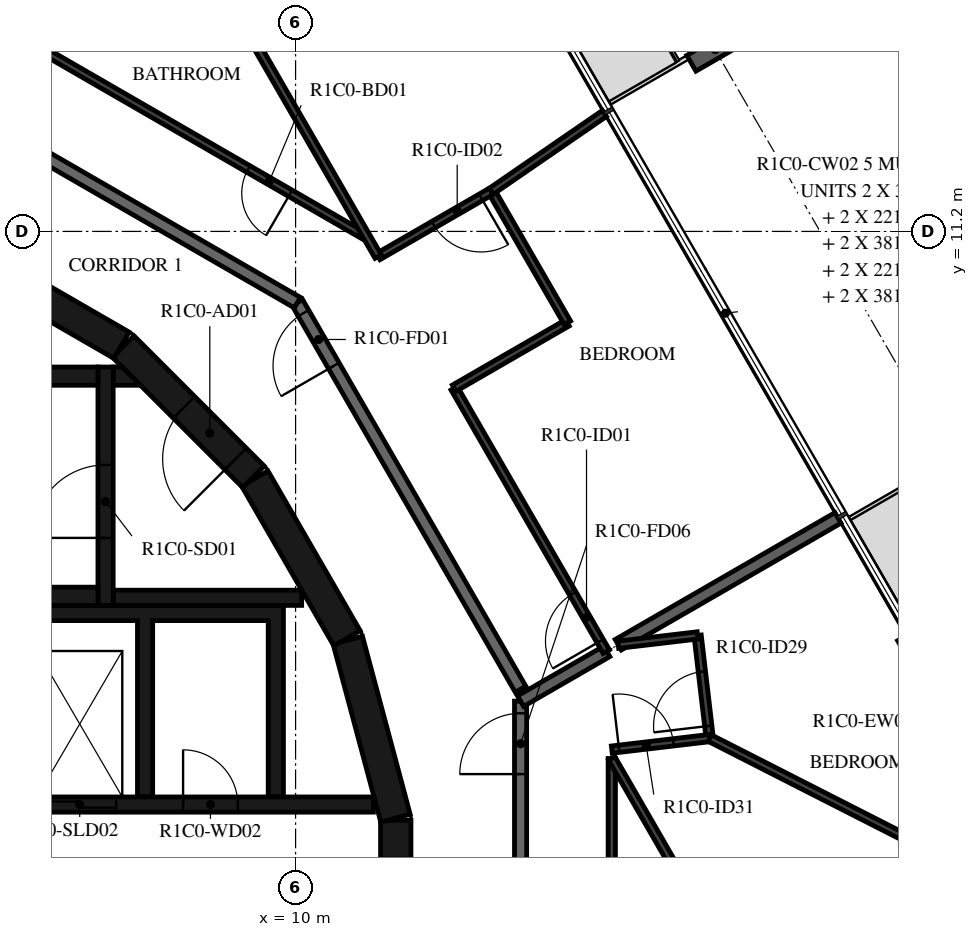
"""IFC4 building model, lengths in metres.
Left out: names, types, materials, properties, quantities, classifications, styles, units other than length and angle.
Written with IfcOpenShell. Run it as: python <this file> out.ifc"""

import sys

from ifc_helpers import new_model, si_unit, direction, frame, frame_2d, origin, origin_2d, place, context, subcontext, project, spatial, polyline, rectangle, i_section, outline, extrude, element, fill, save


model = new_model("IFC4")
c1 = context("Model", 3, precision=1e-05, world=origin(), true_north=direction((0.0, 1.0)))
c2 = subcontext(c1, "Body", "Model", "MODEL_VIEW")
j1 = project(units=[si_unit("LENGTHUNIT", "METRE"), si_unit("PLANEANGLEUNIT", "RADIAN")], contexts=[c1])
p1 = place(None, origin())
s1 = spatial("IfcSite", under=j1, at=p1, CompositionType="ELEMENT")
p2 = place(p1, origin())
s2 = spatial("IfcBuilding", under=s1, at=p2, CompositionType="ELEMENT")
p3 = place(p2, frame((0.0, 0.0, 66.4)))
s3 = spatial("IfcBuildingStorey", under=s2, at=p3, CompositionType="ELEMENT", Elevation=66.4)
p4 = place(p3, frame((16.899, 14.19, -0.38), z_axis=(0.0, 0.0, 1.0), x_axis=(0.50000017485, -0.866025302835, 0.0)))
e1 = element("IfcColumn", 1, at=p4, inside=s3, PredefinedType="COLUMN", context=c2, shape_type="SweptSolid", body=[
    extrude(i_section(OverallWidth=0.3, OverallDepth=0.9, WebThickness=0.019, FlangeThickness=0.035, FilletRadius=0.03, at=origin_2d()), origin(), (0.0, 0.0, 1.0), 2.616),
])
p5 = place(p3, frame((21.571, 1.738, 0.0), z_axis=(0.0, 0.0, 1.0), x_axis=(-0.500028443584, 0.866008981251, 0.0)))
e2 = element("IfcWall", 2, at=p5, inside=s3, PredefinedType="STANDARD", context=c2, shape_type="SweptSolid", body=[
    extrude(rectangle(XDim=3.2, YDim=0.16, at=frame_2d((1.6, 0.0))), origin(), (0.0, 0.0, 1.0), 3.05),
])
p6 = place(p5, frame((0.4, 0.0, 0.0)))
e3 = element("IfcOpeningElement", 3, at=p6, cuts=e2, PredefinedType="OPENING", context=c2, shape_type="SweptSolid", body=[
    extrude(rectangle(XDim=2.4, YDim=2.4, at=frame_2d((1.2, 1.2))), frame((0.0, 0.09, 0.0), z_axis=(0.0, -1.0, 0.0), x_axis=(1.0, 0.0, 0.0)), (0.0, 0.0, 1.0), 0.18),
])
p7 = place(p3, frame((11.647, -1.516, 0.0), z_axis=(0.0, 0.0, 1.0), x_axis=(0.0, 1.0, 0.0)))
e4 = element("IfcWall", 4, at=p7, inside=s3, PredefinedType="SHEAR", context=c2, shape_type="SweptSolid", body=[
    extrude(rectangle(XDim=3.033, YDim=0.5, at=frame_2d((1.516, 0.0))), origin(), (0.0, 0.0, 1.0), 3.05),
])
p8 = place(p7, frame((0.616, 0.0, 0.0)))
e5 = element("IfcOpeningElement", 5, at=p8, cuts=e4, PredefinedType="OPENING", context=c2, shape_type="SweptSolid", body=[
    extrude(rectangle(XDim=1.8, YDim=2.1, at=frame_2d((0.9, 1.05))), frame((0.0, 0.26, 0.0), z_axis=(0.0, -1.0, 0.0), x_axis=(1.0, 0.0, 0.0)), (0.0, 0.0, 1.0), 0.52),
])
for number, where, z_axis, x_axis in (
    (6, (11.643, 1.55, 0.0), (0.0, 0.0, 1.0), (-0.259, 0.966, 0.0)),
    (7, (10.845, 4.51, 0.0), (0.0, 0.0, 1.0), (-0.5, 0.866, 0.0)),
):
    element("IfcWall", number, at=place(p3, frame(where, z_axis=z_axis, x_axis=x_axis)), inside=s3, PredefinedType="SHEAR", context=c2, shape_type="SweptSolid", body=[
        extrude(rectangle(XDim=3.033, YDim=0.5, at=frame_2d((1.516, 0.0))), origin(), (0.0, 0.0, 1.0), 3.05),
    ])
p9 = place(p3, frame((9.308, 7.164, 0.0), z_axis=(0.0, 0.0, 1.0), x_axis=(-0.707106781187, 0.707106781187, 0.0)))
e8 = element("IfcWall", 8, at=p9, inside=s3, PredefinedType="SHEAR", context=c2, shape_type="SweptSolid", body=[
    extrude(rectangle(XDim=3.032, YDim=0.5, at=frame_2d((1.516, 0.0))), origin(), (0.0, 0.0, 1.0), 3.05),
])
p10 = place(p9, frame((0.416, 0.0, 0.0)))
e9 = element("IfcOpeningElement", 9, at=p10, cuts=e8, PredefinedType="OPENING", context=c2, shape_type="SweptSolid", body=[
    extrude(rectangle(XDim=1.2, YDim=2.1, at=frame_2d((0.6, 1.05))), frame((0.0, 0.26, 0.0), z_axis=(0.0, -1.0, 0.0), x_axis=(1.0, 0.0, 0.0)), (0.0, 0.0, 1.0), 0.52),
])
p11 = place(p3, frame((7.137, 9.329, 0.0), z_axis=(0.0, 0.0, 1.0), x_axis=(-0.865975092491, 0.500087131594, 0.0)))
e10 = element("IfcWall", 10, at=p11, inside=s3, PredefinedType="SHEAR", context=c2, shape_type="SweptSolid", body=[
    extrude(rectangle(XDim=3.033, YDim=0.5, at=frame_2d((1.516, 0.0))), origin(), (0.0, 0.0, 1.0), 3.05),
])
for number, where, z_axis, x_axis in (
    (11, (0.0, 5.2, 0.0), (0.0, 0.0, 1.0), (1.0, 0.0, 0.0)),
    (12, (0.0, 8.82, 0.0), (0.0, 0.0, 1.0), (1.0, 0.0, 0.0)),
):
    element("IfcWall", number, at=place(p3, frame(where, z_axis=z_axis, x_axis=x_axis)), inside=s3, PredefinedType="SHEAR", context=c2, shape_type="SweptSolid", body=[
        extrude(rectangle(XDim=6.75, YDim=0.3, at=frame_2d((3.375, 0.0))), origin(), (0.0, 0.0, 1.0), 3.05),
    ])
p12 = place(p3, frame((6.875, 5.05, 0.0), z_axis=(0.0, 0.0, 1.0), x_axis=(0.0, 1.0, 0.0)))
e13 = element("IfcWall", 13, at=p12, inside=s3, PredefinedType="SHEAR", context=c2, shape_type="SweptSolid", body=[
    extrude(rectangle(XDim=3.92, YDim=0.25, at=frame_2d((1.96, 0.0))), origin(), (0.0, 0.0, 1.0), 3.05),
])
p13 = place(p12, frame((1.11, 0.0, 0.0)))
e14 = element("IfcOpeningElement", 14, at=p13, cuts=e13, PredefinedType="OPENING", context=c2, shape_type="SweptSolid", body=[
    extrude(rectangle(XDim=1.2, YDim=2.1, at=frame_2d((0.6, 1.05))), frame((0.0, 0.135, 0.0), z_axis=(0.0, -1.0, 0.0), x_axis=(1.0, 0.0, 0.0)), (0.0, 0.0, 1.0), 0.27),
])
p14 = place(p3, frame((7.0, 5.175, 0.0), z_axis=(0.0, 0.0, 1.0), x_axis=(1.0, 0.0, 0.0)))
e15 = element("IfcWall", 15, at=p14, inside=s3, PredefinedType="SHEAR", context=c2, shape_type="SweptSolid", body=[
    extrude(rectangle(XDim=3.1, YDim=0.25, at=frame_2d((1.55, 0.0))), origin(), (0.0, 0.0, 1.0), 3.05),
])
p15 = place(p3, origin())
e16 = element("IfcWall", 16, at=p15, inside=s3, PredefinedType="SHEAR", context=c2, shape_type="SweptSolid", body=[
    extrude(outline(polyline([(7.448, 8.67), (7.0, 8.67), (7.0, 8.97), (7.148, 8.97), (7.448, 8.67)])), origin(), (0.0, 0.0, 1.0), 3.05),
])
p16 = place(p3, origin())
e17 = element("IfcWall", 17, at=p16, inside=s3, PredefinedType="SHEAR", context=c2, shape_type="SweptSolid", body=[
    extrude(outline(polyline([(-9.55, 4.8), (-7.65, 4.8), (-7.65, 1.9), (-7.4, 1.9), (-7.4, 4.8), (-5.5, 4.8), (-5.5, 1.9), (-5.25, 1.9), (-5.25, 4.8), (-3.35, 4.8), (-3.35, 1.9), (-3.1, 1.9), (-3.1, 4.8), (-1.2, 4.8), (-1.2, 1.9), (-0.95, 1.9), (-0.95, 4.8), (3.1, 4.8), (3.1, 1.9), (3.35, 1.9), (3.35, 4.8), (5.25, 4.8), (5.25, 1.9), (5.5, 1.9), (5.5, 4.8), (7.4, 4.8), (7.4, 1.9), (7.65, 1.9), (7.65, 4.8), (9.55, 4.8), (9.55, 1.9), (9.8, 1.9), (9.8, 4.8), (9.8, 5.05), (-9.8, 5.05), (-9.8, 4.8), (-9.8, 1.9), (-9.55, 1.9), (-9.55, 4.8)])), origin(), (0.0, 0.0, 1.0), 3.05),
])
p17 = place(p3, frame((3.35, 1.775, 0.0), z_axis=(0.0, 0.0, 1.0), x_axis=(1.0, 0.0, 0.0)))
e18 = element("IfcWall", 18, at=p17, inside=s3, PredefinedType="SHEAR", context=c2, shape_type="SweptSolid", body=[
    extrude(rectangle(XDim=7.93, YDim=0.25, at=frame_2d((3.965, 0.0))), origin(), (0.0, 0.0, 1.0), 3.05),
])
p18 = place(p17, frame((0.35, 0.0, 0.0)))
e19 = element("IfcOpeningElement", 19, at=p18, cuts=e18, PredefinedType="OPENING", context=c2, shape_type="SweptSolid", body=[
    extrude(rectangle(XDim=1.2, YDim=2.4, at=frame_2d((0.6, 1.2))), frame((0.0, 0.135, 0.0), z_axis=(0.0, -1.0, 0.0), x_axis=(1.0, 0.0, 0.0)), (0.0, 0.0, 1.0), 0.27),
])
p19 = place(p17, frame((2.5, 0.0, 0.0)))
e20 = element("IfcOpeningElement", 20, at=p19, cuts=e18, PredefinedType="OPENING", context=c2, shape_type="SweptSolid", body=[
    extrude(rectangle(XDim=1.2, YDim=2.4, at=frame_2d((0.6, 1.2))), frame((0.0, 0.135, 0.0), z_axis=(0.0, -1.0, 0.0), x_axis=(1.0, 0.0, 0.0)), (0.0, 0.0, 1.0), 0.27),
])
p20 = place(p17, frame((4.8, 0.0, 0.0)))
e21 = element("IfcOpeningElement", 21, at=p20, cuts=e18, PredefinedType="OPENING", context=c2, shape_type="SweptSolid", body=[
    extrude(rectangle(XDim=0.9, YDim=2.1, at=frame_2d((0.45, 1.05))), frame((0.0, 0.135, 0.0), z_axis=(0.0, -1.0, 0.0), x_axis=(1.0, 0.0, 0.0)), (0.0, 0.0, 1.0), 0.27),
])
p21 = place(p3, frame((13.7, 3.671, 0.0), z_axis=(0.0, 0.0, 1.0), x_axis=(-0.500001669485, 0.866024439905, 0.0)))
e22 = element("IfcWall", 22, at=p21, inside=s3, PredefinedType="STANDARD", context=c2, shape_type="SweptSolid", body=[
    extrude(rectangle(XDim=7.342, YDim=0.2, at=frame_2d((3.671, 0.0))), origin(), (0.0, 0.0, 1.0), 3.05),
])
p22 = place(p21, frame((6.142, 0.0, 0.0)))
e23 = element("IfcOpeningElement", 23, at=p22, cuts=e22, PredefinedType="OPENING", context=c2, shape_type="SweptSolid", body=[
    extrude(rectangle(XDim=1.0, YDim=2.1, at=frame_2d((0.5, 1.05))), frame((0.0, 0.11, 0.0), z_axis=(0.0, -1.0, 0.0), x_axis=(1.0, 0.0, 0.0)), (0.0, 0.0, 1.0), 0.22),
])
p23 = place(p3, frame((10.029, 10.029, 0.0), z_axis=(0.0, 0.0, 1.0), x_axis=(-0.866024439905, 0.500001669485, 0.0)))
e24 = element("IfcWall", 24, at=p23, inside=s3, PredefinedType="STANDARD", context=c2, shape_type="SweptSolid", body=[
    extrude(rectangle(XDim=7.342, YDim=0.2, at=frame_2d((3.671, 0.0))), origin(), (0.0, 0.0, 1.0), 3.05),
])
p24 = place(p3, frame((13.7, -3.671, 0.0), z_axis=(0.0, 0.0, 1.0), x_axis=(0.0, 1.0, 0.0)))
e25 = element("IfcWall", 25, at=p24, inside=s3, PredefinedType="STANDARD", context=c2, shape_type="SweptSolid", body=[
    extrude(rectangle(XDim=7.146, YDim=0.2, at=frame_2d((3.573, 0.0))), origin(), (0.0, 0.0, 1.0), 3.05),
])
p25 = place(p24, frame((5.947, 0.0, 0.0)))
e26 = element("IfcOpeningElement", 26, at=p25, cuts=e25, PredefinedType="OPENING", context=c2, shape_type="SweptSolid", body=[
    extrude(rectangle(XDim=1.0, YDim=2.1, at=frame_2d((0.5, 1.05))), frame((0.0, 0.11, 0.0), z_axis=(0.0, -1.0, 0.0), x_axis=(1.0, 0.0, 0.0)), (0.0, 0.0, 1.0), 0.22),
])
p26 = place(p3, frame((13.7, 3.476, 0.0), z_axis=(0.0, 0.0, 1.0), x_axis=(0.866014281772, 0.500019263395, 0.0)))
e27 = element("IfcWall", 27, at=p26, inside=s3, PredefinedType="STANDARD", context=c2, shape_type="SweptSolid", body=[
    extrude(rectangle(XDim=1.638, YDim=0.2, at=frame_2d((0.819, 0.0))), origin(), (0.0, 0.0, 1.0), 3.05),
])
p27 = place(p3, frame((15.306, 4.403, 0.0), z_axis=(0.0, 0.0, 1.0), x_axis=(0.866013143551, 0.500021234745, 0.0)))
e28 = element("IfcWall", 28, at=p27, inside=s3, PredefinedType="STANDARD", context=c2, shape_type="SweptSolid", body=[
    extrude(rectangle(XDim=4.173, YDim=0.2, at=frame_2d((2.086, 0.0))), origin(), (0.0, 0.0, 1.0), 3.05),
])
p28 = place(p3, frame((15.11, 4.289, 0.0), z_axis=(0.0, 0.0, 1.0), x_axis=(-0.500033654285, 0.866005972602, 0.0)))
e29 = element("IfcWall", 29, at=p28, inside=s3, PredefinedType="PARTITIONING", context=c2, shape_type="SweptSolid", body=[
    extrude(rectangle(XDim=5.003, YDim=0.12, at=frame_2d((2.501, 0.0))), origin(), (0.0, 0.0, 1.0), 3.05),
])
p29 = place(p28, frame((0.2, 0.0, 0.0)))
e30 = element("IfcOpeningElement", 30, at=p29, cuts=e29, PredefinedType="OPENING", context=c2, shape_type="SweptSolid", body=[
    extrude(rectangle(XDim=0.9, YDim=2.1, at=frame_2d((0.45, 1.05))), frame((0.0, 0.07, 0.0), z_axis=(0.0, -1.0, 0.0), x_axis=(1.0, 0.0, 0.0)), (0.0, 0.0, 1.0), 0.14),
])
p30 = place(p3, frame((12.608, 8.622, 0.0), z_axis=(0.0, 0.0, 1.0), x_axis=(0.866005997533, 0.500033611107, 0.0)))
e31 = element("IfcWall", 31, at=p30, inside=s3, PredefinedType="PARTITIONING", context=c2, shape_type="SweptSolid", body=[
    extrude(rectangle(XDim=2.151, YDim=0.12, at=frame_2d((1.075, 0.0))), origin(), (0.0, 0.0, 1.0), 3.05),
])
p31 = place(p3, frame((14.471, 9.697, 0.0), z_axis=(0.0, 0.0, 1.0), x_axis=(-0.500004234368, 0.866022959057, 0.0)))
e32 = element("IfcWall", 32, at=p31, inside=s3, PredefinedType="PARTITIONING", context=c2, shape_type="SweptSolid", body=[
    extrude(rectangle(XDim=2.5, YDim=0.12, at=frame_2d((1.25, 0.0))), origin(), (0.0, 0.0, 1.0), 3.05),
])
p32 = place(p3, frame((13.221, 11.862, 0.0), z_axis=(0.0, 0.0, 1.0), x_axis=(-0.866055151781, -0.499948471418, 0.0)))
e33 = element("IfcWall", 33, at=p32, inside=s3, PredefinedType="PARTITIONING", context=c2, shape_type="SweptSolid", body=[
    extrude(rectangle(XDim=2.151, YDim=0.12, at=frame_2d((1.075, 0.0))), origin(), (0.0, 0.0, 1.0), 3.05),
])
p33 = place(p32, frame((0.2, 0.0, 0.0)))
e34 = element("IfcOpeningElement", 34, at=p33, cuts=e33, PredefinedType="OPENING", context=c2, shape_type="SweptSolid", body=[
    extrude(rectangle(XDim=0.9, YDim=2.1, at=frame_2d((0.45, 1.05))), frame((0.0, 0.07, 0.0), z_axis=(0.0, -1.0, 0.0), x_axis=(1.0, 0.0, 0.0)), (0.0, 0.0, 1.0), 0.14),
])
p34 = place(p3, frame((11.127, 11.127, 0.0), z_axis=(0.0, 0.0, 1.0), x_axis=(-0.86602299963, 0.500004164094, 0.0)))
e35 = element("IfcWall", 35, at=p34, inside=s3, PredefinedType="PARTITIONING", context=c2, shape_type="SweptSolid", body=[
    extrude(rectangle(XDim=7.052, YDim=0.12, at=frame_2d((3.526, 0.0))), origin(), (0.0, 0.0, 1.0), 3.05),
])
p35 = place(p34, frame((1.4, 0.0, 0.0)))
e36 = element("IfcOpeningElement", 36, at=p35, cuts=e35, PredefinedType="OPENING", context=c2, shape_type="SweptSolid", body=[
    extrude(rectangle(XDim=0.8, YDim=2.1, at=frame_2d((0.4, 1.05))), frame((0.0, 0.07, 0.0), z_axis=(0.0, -1.0, 0.0), x_axis=(1.0, 0.0, 0.0)), (0.0, 0.0, 1.0), 0.14),
])
p36 = place(p3, frame((15.08, 13.14, 0.0), z_axis=(0.0, 0.0, 1.0), x_axis=(-0.824041924199, -0.566528822887, 0.0)))
e37 = element("IfcWall", 37, at=p36, inside=s3, PredefinedType="PARTITIONING", context=c2, shape_type="SweptSolid", body=[
    extrude(rectangle(XDim=2.256, YDim=0.12, at=frame_2d((1.128, 0.0))), origin(), (0.0, 0.0, 1.0), 3.05),
])
p37 = place(p3, frame((8.7, 15.392, 0.0), z_axis=(0.0, 0.0, 1.0), x_axis=(0.499986106925, -0.866033424806, 0.0)))
e38 = element("IfcWall", 38, at=p37, inside=s3, PredefinedType="PARTITIONING", context=c2, shape_type="SweptSolid", body=[
    extrude(rectangle(XDim=5.317, YDim=0.12, at=frame_2d((2.659, 0.0))), origin(), (0.0, 0.0, 1.0), 3.05),
])
p38 = place(p3, frame((16.81, 2.868, 0.0), z_axis=(0.0, 0.0, 1.0), x_axis=(-0.117049566217, 0.993126074096, 0.0)))
e39 = element("IfcWall", 39, at=p38, inside=s3, PredefinedType="PARTITIONING", context=c2, shape_type="SweptSolid", body=[
    extrude(rectangle(XDim=1.7, YDim=0.12, at=frame_2d((0.85, 0.0))), origin(), (0.0, 0.0, 1.0), 3.05),
])
p39 = place(p38, frame((0.2, 0.0, 0.0)))
e40 = element("IfcOpeningElement", 40, at=p39, cuts=e39, PredefinedType="OPENING", context=c2, shape_type="SweptSolid", body=[
    extrude(rectangle(XDim=0.9, YDim=2.1, at=frame_2d((0.45, 1.05))), frame((0.0, 0.07, 0.0), z_axis=(0.0, -1.0, 0.0), x_axis=(1.0, 0.0, 0.0)), (0.0, 0.0, 1.0), 0.14),
])
p40 = place(p3, frame((16.611, 4.556, 0.0), z_axis=(0.0, 0.0, 1.0), x_axis=(-0.993151872114, -0.116830470836, 0.0)))
e41 = element("IfcWall", 41, at=p40, inside=s3, PredefinedType="PARTITIONING", context=c2, shape_type="SweptSolid", body=[
    extrude(rectangle(XDim=1.314, YDim=0.12, at=frame_2d((0.657, 0.0))), origin(), (0.0, 0.0, 1.0), 3.05),
])
p41 = place(p3, frame((15.2, 2.679, 0.0), z_axis=(0.0, 0.0, 1.0), x_axis=(0.993150604323, 0.116841247567, 0.0)))
e42 = element("IfcWall", 42, at=p41, inside=s3, PredefinedType="PARTITIONING", context=c2, shape_type="SweptSolid", body=[
    extrude(rectangle(XDim=1.621, YDim=0.12, at=frame_2d((0.811, 0.0))), origin(), (0.0, 0.0, 1.0), 3.05),
])
p42 = place(p41, frame((0.12, 0.0, 0.0)))
e43 = element("IfcOpeningElement", 43, at=p42, cuts=e42, PredefinedType="OPENING", context=c2, shape_type="SweptSolid", body=[
    extrude(rectangle(XDim=0.9, YDim=2.1, at=frame_2d((0.45, 1.05))), frame((0.0, 0.07, 0.0), z_axis=(0.0, -1.0, 0.0), x_axis=(1.0, 0.0, 0.0)), (0.0, 0.0, 1.0), 0.14),
])
p43 = place(p3, frame((15.2, -4.055, 0.0), z_axis=(0.0, 0.0, 1.0), x_axis=(0.0, 1.0, 0.0)))
e44 = element("IfcWall", 44, at=p43, inside=s3, PredefinedType="PARTITIONING", context=c2, shape_type="SweptSolid", body=[
    extrude(rectangle(XDim=6.588, YDim=0.12, at=frame_2d((3.294, 0.0))), origin(), (0.0, 0.0, 1.0), 3.05),
])
p44 = place(p43, frame((0.4, 0.0, 0.0)))
e45 = element("IfcOpeningElement", 45, at=p44, cuts=e44, PredefinedType="OPENING", context=c2, shape_type="SweptSolid", body=[
    extrude(rectangle(XDim=0.8, YDim=2.1, at=frame_2d((0.4, 1.05))), frame((0.0, 0.07, 0.0), z_axis=(0.0, -1.0, 0.0), x_axis=(1.0, 0.0, 0.0)), (0.0, 0.0, 1.0), 0.14),
])
p45 = place(p3, frame((16.81, 2.868, 0.0), z_axis=(0.0, 0.0, 1.0), x_axis=(0.891097252128, -0.453812392128, 0.0)))
e46 = element("IfcWall", 46, at=p45, inside=s3, PredefinedType="PARTITIONING", context=c2, shape_type="SweptSolid", body=[
    extrude(rectangle(XDim=6.677, YDim=0.12, at=frame_2d((3.338, 0.0))), origin(), (0.0, 0.0, 1.0), 3.05),
])
p46 = place(p3, frame((15.2, 2.533, 0.0), z_axis=(0.0, 0.0, 1.0), x_axis=(0.500001127339, -0.866024752914, 0.0)))
e47 = element("IfcWall", 47, at=p46, inside=s3, PredefinedType="PARTITIONING", context=c2, shape_type="SweptSolid", body=[
    extrude(rectangle(XDim=14.434, YDim=0.12, at=frame_2d((7.217, 0.0))), origin(), (0.0, 0.0, 1.0), 3.05),
])
p47 = place(p46, frame((11.97, 0.0, 0.0)))
e48 = element("IfcOpeningElement", 48, at=p47, cuts=e47, PredefinedType="OPENING", context=c2, shape_type="SweptSolid", body=[
    extrude(rectangle(XDim=0.9, YDim=2.1, at=frame_2d((0.45, 1.05))), frame((0.0, 0.07, 0.0), z_axis=(0.0, -1.0, 0.0), x_axis=(1.0, 0.0, 0.0)), (0.0, 0.0, 1.0), 0.14),
])
p48 = place(p13, origin())
e49 = element("IfcDoor", 49, at=p48, inside=s3, OperationType="SINGLE_SWING_LEFT", PredefinedType="DOOR", context=c2, shape_type="SweptSolid", body=[
    extrude(rectangle(XDim=1.2, YDim=2.1, at=frame_2d((0.6, 1.05))), frame((0.0, 0.025, 0.0), z_axis=(0.0, -1.0, 0.0), x_axis=(1.0, 0.0, 0.0)), (0.0, 0.0, 1.0), 0.05),
])
fill(e14, e49)
p49 = place(p10, origin())
e50 = element("IfcDoor", 50, at=p49, inside=s3, OperationType="SINGLE_SWING_RIGHT", PredefinedType="DOOR", context=c2, shape_type="SweptSolid", body=[
    extrude(rectangle(XDim=1.2, YDim=2.1, at=frame_2d((0.6, 1.05))), frame((0.0, 0.025, 0.0), z_axis=(0.0, -1.0, 0.0), x_axis=(1.0, 0.0, 0.0)), (0.0, 0.0, 1.0), 0.05),
])
fill(e9, e50)
p50 = place(p19, origin())
e51 = element("IfcDoor", 51, at=p50, inside=s3, OperationType="DOUBLE_DOOR_SLIDING", PredefinedType="DOOR", context=c2, shape_type="SweptSolid", body=[
    extrude(rectangle(XDim=1.2, YDim=2.4, at=frame_2d((0.6, 1.2))), frame((0.0, 0.025, 0.0), z_axis=(0.0, -1.0, 0.0), x_axis=(1.0, 0.0, 0.0)), (0.0, 0.0, 1.0), 0.05),
])
fill(e20, e51)
p51 = place(p20, origin())
e52 = element("IfcDoor", 52, at=p51, inside=s3, OperationType="SINGLE_SWING_LEFT", PredefinedType="DOOR", context=c2, shape_type="SweptSolid", body=[
    extrude(rectangle(XDim=0.9, YDim=2.1, at=frame_2d((0.45, 1.05))), frame((0.0, 0.025, 0.0), z_axis=(0.0, -1.0, 0.0), x_axis=(1.0, 0.0, 0.0)), (0.0, 0.0, 1.0), 0.05),
])
fill(e21, e52)
p52 = place(p22, origin())
e53 = element("IfcDoor", 53, at=p52, inside=s3, OperationType="SINGLE_SWING_RIGHT", PredefinedType="DOOR", context=c2, shape_type="SweptSolid", body=[
    extrude(rectangle(XDim=1.0, YDim=2.1, at=frame_2d((0.5, 1.05))), frame((0.0, 0.025, 0.0), z_axis=(0.0, -1.0, 0.0), x_axis=(1.0, 0.0, 0.0)), (0.0, 0.0, 1.0), 0.05),
])
fill(e23, e53)
p53 = place(p29, origin())
e54 = element("IfcDoor", 54, at=p53, inside=s3, OperationType="SINGLE_SWING_LEFT", PredefinedType="DOOR", context=c2, shape_type="SweptSolid", body=[
    extrude(rectangle(XDim=0.9, YDim=2.1, at=frame_2d((0.45, 1.05))), frame((0.0, 0.025, 0.0), z_axis=(0.0, -1.0, 0.0), x_axis=(1.0, 0.0, 0.0)), (0.0, 0.0, 1.0), 0.05),
])
fill(e30, e54)
p54 = place(p33, origin())
e55 = element("IfcDoor", 55, at=p54, inside=s3, OperationType="SINGLE_SWING_RIGHT", PredefinedType="DOOR", context=c2, shape_type="SweptSolid", body=[
    extrude(rectangle(XDim=0.9, YDim=2.1, at=frame_2d((0.45, 1.05))), frame((0.0, 0.025, 0.0), z_axis=(0.0, -1.0, 0.0), x_axis=(1.0, 0.0, 0.0)), (0.0, 0.0, 1.0), 0.05),
])
fill(e34, e55)
p55 = place(p35, origin())
e56 = element("IfcDoor", 56, at=p55, inside=s3, OperationType="SINGLE_SWING_RIGHT", PredefinedType="DOOR", context=c2, shape_type="SweptSolid", body=[
    extrude(rectangle(XDim=0.8, YDim=2.1, at=frame_2d((0.4, 1.05))), frame((0.0, 0.025, 0.0), z_axis=(0.0, -1.0, 0.0), x_axis=(1.0, 0.0, 0.0)), (0.0, 0.0, 1.0), 0.05),
])
fill(e36, e56)
p56 = place(p25, origin())
e57 = element("IfcDoor", 57, at=p56, inside=s3, OperationType="SINGLE_SWING_LEFT", PredefinedType="DOOR", context=c2, shape_type="SweptSolid", body=[
    extrude(rectangle(XDim=1.0, YDim=2.1, at=frame_2d((0.5, 1.05))), frame((0.0, 0.025, 0.0), z_axis=(0.0, -1.0, 0.0), x_axis=(1.0, 0.0, 0.0)), (0.0, 0.0, 1.0), 0.05),
])
fill(e26, e57)
p57 = place(p39, origin())
e58 = element("IfcDoor", 58, at=p57, inside=s3, OperationType="SINGLE_SWING_LEFT", PredefinedType="DOOR", context=c2, shape_type="SweptSolid", body=[
    extrude(rectangle(XDim=0.9, YDim=2.1, at=frame_2d((0.45, 1.05))), frame((0.0, 0.025, 0.0), z_axis=(0.0, -1.0, 0.0), x_axis=(1.0, 0.0, 0.0)), (0.0, 0.0, 1.0), 0.05),
])
fill(e40, e58)
p58 = place(p42, origin())
e59 = element("IfcDoor", 59, at=p58, inside=s3, OperationType="SINGLE_SWING_RIGHT", PredefinedType="DOOR", context=c2, shape_type="SweptSolid", body=[
    extrude(rectangle(XDim=0.9, YDim=2.1, at=frame_2d((0.45, 1.05))), frame((0.0, 0.025, 0.0), z_axis=(0.0, -1.0, 0.0), x_axis=(1.0, 0.0, 0.0)), (0.0, 0.0, 1.0), 0.05),
])
fill(e43, e59)
save(model, sys.argv[1])
